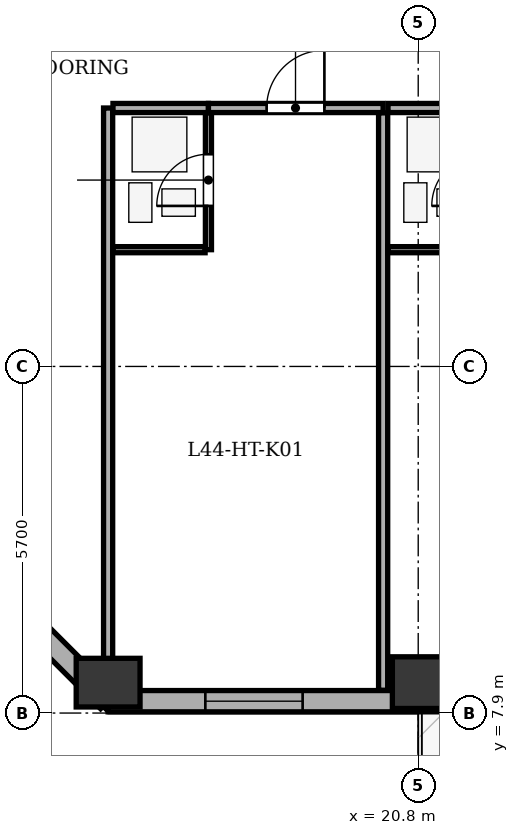
"""IFC4 building model, lengths in metres.
Left out: names, types, materials, properties, quantities, classifications, styles, units other than length and angle.
Written with IfcOpenShell. Run it as: python <this file> out.ifc"""

import sys

from ifc_helpers import new_model, si_unit, direction, frame, frame_2d, origin, origin_2d, place, context, subcontext, project, spatial, rectangle, extrude, element, fill, save


model = new_model("IFC4")
c1 = context("Model", 3, precision=1e-05, world=origin(), true_north=direction((0.0, 1.0)))
c2 = subcontext(c1, "Body", "Model", "MODEL_VIEW")
j1 = project(units=[si_unit("LENGTHUNIT", "METRE"), si_unit("PLANEANGLEUNIT", "RADIAN")], contexts=[c1])
p1 = place(None, origin())
s1 = spatial("IfcSite", under=j1, at=p1, CompositionType="ELEMENT")
p2 = place(p1, origin())
s2 = spatial("IfcBuilding", under=s1, at=p2, CompositionType="ELEMENT")
p3 = place(p2, frame((0.0, 0.0, 172.8)))
s3 = spatial("IfcBuildingStorey", under=s2, at=p3, CompositionType="ELEMENT", Elevation=172.8)
p4 = place(p3, frame((15.7, 8.4, 0.0), z_axis=(0.0, 0.0, 1.0), x_axis=(1.0, 0.0, 0.0)))
e1 = element("IfcColumn", 1, at=p4, inside=s3, PredefinedType="COLUMN", context=c2, shape_type="SweptSolid", body=[
    extrude(rectangle(XDim=0.8, YDim=1.05, at=origin_2d()), origin(), (0.0, 0.0, 1.0), 3.5),
])
p5 = place(p3, frame((20.8, 8.4, 0.0), z_axis=(0.0, 0.0, 1.0), x_axis=(1.0, 0.0, 0.0)))
e2 = element("IfcColumn", 2, at=p5, inside=s3, PredefinedType="COLUMN", context=c2, shape_type="SweptSolid", body=[
    extrude(rectangle(XDim=0.85, YDim=0.85, at=origin_2d()), origin(), (0.0, 0.0, 1.0), 3.5),
])
p6 = place(p3, frame((50.7, 8.095, 0.0), z_axis=(0.0, 0.0, 1.0), x_axis=(-1.0, 0.0, 0.0)))
e3 = element("IfcWall", 3, at=p6, inside=s3, PredefinedType="STANDARD", context=c2, shape_type="SweptSolid", body=[
    extrude(rectangle(XDim=35.0, YDim=0.35, at=frame_2d((17.5, 0.0))), origin(), (0.0, 0.0, 1.0), 2.785),
])
p7 = place(p6, frame((26.0, 0.0, 0.0)))
e4 = element("IfcOpeningElement", 4, at=p7, cuts=e3, PredefinedType="OPENING", context=c2, shape_type="SweptSolid", body=[
    extrude(rectangle(XDim=1.0, YDim=2.02, at=frame_2d((0.5, 1.01))), frame((0.0, 0.185, 0.0), z_axis=(0.0, -1.0, 0.0), x_axis=(1.0, 0.0, 0.0)), (0.0, 0.0, 1.0), 0.37),
])
p8 = place(p6, frame((1.763, 0.0, 0.75)))
e5 = element("IfcOpeningElement", 5, at=p8, cuts=e3, PredefinedType="OPENING", context=c2, shape_type="SweptSolid", body=[
    extrude(rectangle(XDim=1.6, YDim=1.75, at=frame_2d((0.8, 0.875))), frame((0.0, 0.185, 0.0), z_axis=(0.0, -1.0, 0.0), x_axis=(1.0, 0.0, 0.0)), (0.0, 0.0, 1.0), 0.37),
])
p9 = place(p6, frame((6.764, 0.0, 0.75)))
e6 = element("IfcOpeningElement", 6, at=p9, cuts=e3, PredefinedType="OPENING", context=c2, shape_type="SweptSolid", body=[
    extrude(rectangle(XDim=1.6, YDim=1.75, at=frame_2d((0.8, 0.875))), frame((0.0, 0.185, 0.0), z_axis=(0.0, -1.0, 0.0), x_axis=(1.0, 0.0, 0.0)), (0.0, 0.0, 1.0), 0.37),
])
p10 = place(p6, frame((12.001, 0.0, 0.75)))
e7 = element("IfcOpeningElement", 7, at=p10, cuts=e3, PredefinedType="OPENING", context=c2, shape_type="SweptSolid", body=[
    extrude(rectangle(XDim=1.6, YDim=1.75, at=frame_2d((0.8, 0.875))), frame((0.0, 0.185, 0.0), z_axis=(0.0, -1.0, 0.0), x_axis=(1.0, 0.0, 0.0)), (0.0, 0.0, 1.0), 0.37),
])
p11 = place(p6, frame((17.467, 0.0, 0.75)))
e8 = element("IfcOpeningElement", 8, at=p11, cuts=e3, PredefinedType="OPENING", context=c2, shape_type="SweptSolid", body=[
    extrude(rectangle(XDim=1.6, YDim=1.75, at=frame_2d((0.8, 0.875))), frame((0.0, 0.185, 0.0), z_axis=(0.0, -1.0, 0.0), x_axis=(1.0, 0.0, 0.0)), (0.0, 0.0, 1.0), 0.37),
])
p12 = place(p6, frame((31.801, 0.0, 0.75)))
e9 = element("IfcOpeningElement", 9, at=p12, cuts=e3, PredefinedType="OPENING", context=c2, shape_type="SweptSolid", body=[
    extrude(rectangle(XDim=1.6, YDim=1.75, at=frame_2d((0.8, 0.875))), frame((0.0, 0.185, 0.0), z_axis=(0.0, -1.0, 0.0), x_axis=(1.0, 0.0, 0.0)), (0.0, 0.0, 1.0), 0.37),
])
p13 = place(p6, frame((23.914, 0.0, 0.75)))
e10 = element("IfcOpeningElement", 10, at=p13, cuts=e3, PredefinedType="OPENING", context=c2, shape_type="SweptSolid", body=[
    extrude(rectangle(XDim=0.75, YDim=1.45, at=frame_2d((0.375, 0.725))), frame((0.0, 0.185, 0.0), z_axis=(0.0, -1.0, 0.0), x_axis=(1.0, 0.0, 0.0)), (0.0, 0.0, 1.0), 0.37),
])
p14 = place(p3, frame((15.7, 8.095, 0.0), z_axis=(0.0, 0.0, 1.0), x_axis=(-0.707106781187, 0.707106781187, 0.0)))
e11 = element("IfcWall", 11, at=p14, inside=s3, PredefinedType="STANDARD", context=c2, shape_type="SweptSolid", body=[
    extrude(rectangle(XDim=6.795, YDim=0.35, at=frame_2d((3.397, 0.0))), origin(), (0.0, 0.0, 1.0), 2.785),
])
p15 = place(p14, frame((2.698, 0.0, 0.75)))
e12 = element("IfcOpeningElement", 12, at=p15, cuts=e11, PredefinedType="OPENING", context=c2, shape_type="SweptSolid", body=[
    extrude(rectangle(XDim=1.4, YDim=1.65, at=frame_2d((0.7, 0.825))), frame((0.0, 0.185, 0.0), z_axis=(0.0, -1.0, 0.0), x_axis=(1.0, 0.0, 0.0)), (0.0, 0.0, 1.0), 0.37),
])
p16 = place(p3, frame((15.7, 8.275, 0.0), z_axis=(0.0, 0.0, 1.0), x_axis=(0.0, 1.0, 0.0)))
e13 = element("IfcWall", 13, at=p16, inside=s3, PredefinedType="PARTITIONING", context=c2, shape_type="SweptSolid", body=[
    extrude(rectangle(XDim=9.575, YDim=0.15, at=frame_2d((4.788, 0.0))), origin(), (0.0, 0.0, 1.0), 3.2),
])
p17 = place(p3, frame((15.78, 17.85, 0.0), z_axis=(0.0, 0.0, 1.0), x_axis=(1.0, 0.0, 0.0)))
e14 = element("IfcWall", 14, at=p17, inside=s3, PredefinedType="PARTITIONING", context=c2, shape_type="SweptSolid", body=[
    extrude(rectangle(XDim=1.57, YDim=0.15, at=frame_2d((0.785, 0.0))), origin(), (0.0, 0.0, 1.0), 3.2),
])
p18 = place(p3, frame((17.35, 17.85, 0.0), z_axis=(0.0, 0.0, 1.0), x_axis=(1.0, 0.0, 0.0)))
e15 = element("IfcWall", 15, at=p18, inside=s3, PredefinedType="PARTITIONING", context=c2, shape_type="SweptSolid", body=[
    extrude(rectangle(XDim=2.873, YDim=0.15, at=frame_2d((1.437, 0.0))), origin(), (0.0, 0.0, 1.0), 3.2),
])
p19 = place(p18, frame((0.957, 0.0, 0.0)))
e16 = element("IfcOpeningElement", 16, at=p19, cuts=e15, PredefinedType="OPENING", context=c2, shape_type="SweptSolid", body=[
    extrude(rectangle(XDim=0.95, YDim=2.1, at=frame_2d((0.475, 1.05))), frame((0.0, 0.085, 0.0), z_axis=(0.0, -1.0, 0.0), x_axis=(1.0, 0.0, 0.0)), (0.0, 0.0, 1.0), 0.17),
])
p20 = place(p3, frame((17.35, 15.52, 0.0), z_axis=(0.0, 0.0, 1.0), x_axis=(0.0, 1.0, 0.0)))
e17 = element("IfcWall", 17, at=p20, inside=s3, PredefinedType="PARTITIONING", context=c2, shape_type="SweptSolid", body=[
    extrude(rectangle(XDim=2.25, YDim=0.1, at=frame_2d((1.125, 0.0))), origin(), (0.0, 0.0, 1.0), 3.2),
])
p21 = place(p20, frame((0.72, 0.0, 0.0)))
e18 = element("IfcOpeningElement", 18, at=p21, cuts=e17, PredefinedType="OPENING", context=c2, shape_type="SweptSolid", body=[
    extrude(rectangle(XDim=0.85, YDim=2.05, at=frame_2d((0.425, 1.025))), frame((0.0, 0.06, 0.0), z_axis=(0.0, -1.0, 0.0), x_axis=(1.0, 0.0, 0.0)), (0.0, 0.0, 1.0), 0.12),
])
p22 = place(p3, frame((15.78, 15.52, 0.0), z_axis=(0.0, 0.0, 1.0), x_axis=(1.0, 0.0, 0.0)))
e19 = element("IfcWall", 19, at=p22, inside=s3, PredefinedType="PARTITIONING", context=c2, shape_type="SweptSolid", body=[
    extrude(rectangle(XDim=1.515, YDim=0.1, at=frame_2d((0.757, 0.0))), origin(), (0.0, 0.0, 1.0), 3.2),
])
p23 = place(p3, frame((20.223, 8.275, 0.0), z_axis=(0.0, 0.0, 1.0), x_axis=(0.0, 1.0, 0.0)))
e20 = element("IfcWall", 20, at=p23, inside=s3, PredefinedType="PARTITIONING", context=c2, shape_type="SweptSolid", body=[
    extrude(rectangle(XDim=9.495, YDim=0.15, at=frame_2d((4.748, 0.0))), origin(), (0.0, 0.0, 1.0), 3.2),
])
p24 = place(p3, frame((20.303, 17.85, 0.0), z_axis=(0.0, 0.0, 1.0), x_axis=(1.0, 0.0, 0.0)))
e21 = element("IfcWall", 21, at=p24, inside=s3, PredefinedType="PARTITIONING", context=c2, shape_type="SweptSolid", body=[
    extrude(rectangle(XDim=1.57, YDim=0.15, at=frame_2d((0.785, 0.0))), origin(), (0.0, 0.0, 1.0), 3.2),
])
p25 = place(p3, frame((20.303, 15.52, 0.0), z_axis=(0.0, 0.0, 1.0), x_axis=(1.0, 0.0, 0.0)))
e22 = element("IfcWall", 22, at=p25, inside=s3, PredefinedType="PARTITIONING", context=c2, shape_type="SweptSolid", body=[
    extrude(rectangle(XDim=1.515, YDim=0.1, at=frame_2d((0.758, 0.0))), origin(), (0.0, 0.0, 1.0), 3.2),
])
p26 = place(p12, origin())
e23 = element("IfcWindow", 23, at=p26, inside=s3, PartitioningType="SINGLE_PANEL", PredefinedType="WINDOW", context=c2, shape_type="SweptSolid", body=[
    extrude(rectangle(XDim=1.6, YDim=1.75, at=frame_2d((0.8, 0.875))), frame((0.0, -0.01, 0.0), z_axis=(0.0, -1.0, 0.0), x_axis=(1.0, 0.0, 0.0)), (0.0, 0.0, 1.0), 0.06),
])
fill(e9, e23)
p27 = place(p21, origin())
e24 = element("IfcDoor", 24, at=p27, inside=s3, OperationType="SINGLE_SWING_LEFT", PredefinedType="DOOR", context=c2, shape_type="SweptSolid", body=[
    extrude(rectangle(XDim=0.85, YDim=2.05, at=frame_2d((0.425, 1.025))), frame((0.0, 0.025, 0.0), z_axis=(0.0, -1.0, 0.0), x_axis=(1.0, 0.0, 0.0)), (0.0, 0.0, 1.0), 0.05),
])
fill(e18, e24)
p28 = place(p19, origin())
e25 = element("IfcDoor", 25, at=p28, inside=s3, OperationType="SINGLE_SWING_RIGHT", PredefinedType="DOOR", context=c2, shape_type="SweptSolid", body=[
    extrude(rectangle(XDim=0.95, YDim=2.1, at=frame_2d((0.475, 1.05))), frame((0.0, 0.025, 0.0), z_axis=(0.0, -1.0, 0.0), x_axis=(1.0, 0.0, 0.0)), (0.0, 0.0, 1.0), 0.05),
])
fill(e16, e25)
save(model, sys.argv[1])
